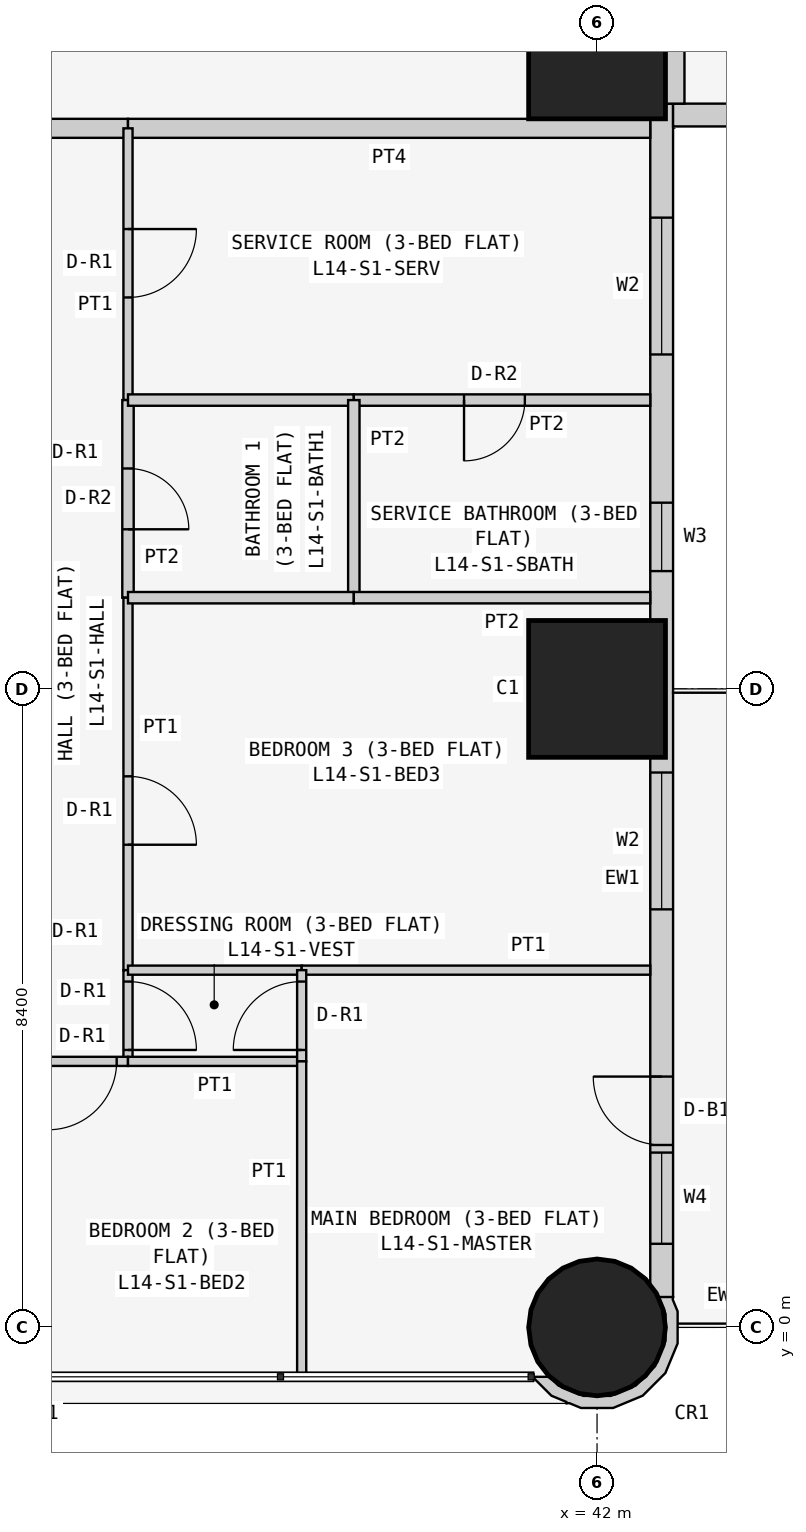
"""IFC4 building model, lengths in metres.
Left out: names, types, materials, properties, quantities, classifications, styles, units other than length and angle.
Written with IfcOpenShell. Run it as: python <this file> out.ifc"""

import sys

from ifc_helpers import new_model, si_unit, direction, frame, frame_2d, origin, origin_2d, place, context, subcontext, project, spatial, polyline, rectangle, circle, outline, extrude, element, fill, save


model = new_model("IFC4")
c1 = context("Model", 3, precision=1e-05, world=origin(), true_north=direction((0.0, 1.0)))
c2 = subcontext(c1, "Body", "Model", "MODEL_VIEW")
j1 = project(units=[si_unit("LENGTHUNIT", "METRE"), si_unit("PLANEANGLEUNIT", "RADIAN")], contexts=[c1])
p1 = place(None, origin())
s1 = spatial("IfcSite", under=j1, at=p1, CompositionType="ELEMENT")
p2 = place(p1, origin())
s2 = spatial("IfcBuilding", under=s1, at=p2, CompositionType="ELEMENT")
p3 = place(p2, frame((0.0, 0.0, 59.7)))
s3 = spatial("IfcBuildingStorey", under=s2, at=p3, CompositionType="ELEMENT", Elevation=59.7)
p4 = place(p3, frame((42.0, 0.0, 0.0), z_axis=(0.0, 0.0, 1.0), x_axis=(1.0, 0.0, 0.0)))
e1 = element("IfcColumn", 1, at=p4, inside=s3, PredefinedType="COLUMN", context=c2, shape_type="SweptSolid", body=[
    extrude(circle(Radius=0.9, at=origin_2d()), origin(), (0.0, 0.0, 1.0), 3.6),
])
for number, where, z_axis, x_axis in (
    (2, (42.0, 8.4, 0.0), (0.0, 0.0, 1.0), (1.0, 0.0, 0.0)),
    (3, (42.0, 16.8, 0.0), (0.0, 0.0, 1.0), (1.0, 0.0, 0.0)),
):
    element("IfcColumn", number, at=place(p3, frame(where, z_axis=z_axis, x_axis=x_axis)), inside=s3, PredefinedType="COLUMN", context=c2, shape_type="SweptSolid", body=[
        extrude(rectangle(XDim=1.8, YDim=1.8, at=origin_2d()), origin(), (0.0, 0.0, 1.0), 3.6),
    ])
p5 = place(p3, frame((42.85, 0.4, 0.0), z_axis=(0.0, 0.0, 1.0), x_axis=(0.0, 1.0, 0.0)))
e4 = element("IfcWall", 4, at=p5, inside=s3, PredefinedType="SOLIDWALL", context=c2, shape_type="SweptSolid", body=[
    extrude(rectangle(XDim=15.7, YDim=0.3, at=frame_2d((7.85, 0.0))), origin(), (0.0, 0.0, 1.0), 3.45),
])
p6 = place(p5, frame((12.4, 0.0, 0.9)))
e5 = element("IfcOpeningElement", 5, at=p6, cuts=e4, PredefinedType="OPENING", context=c2, shape_type="SweptSolid", body=[
    extrude(rectangle(XDim=1.8, YDim=1.5, at=frame_2d((0.9, 0.75))), frame((0.0, 0.16, 0.0), z_axis=(0.0, -1.0, 0.0), x_axis=(1.0, 0.0, 0.0)), (0.0, 0.0, 1.0), 0.32),
])
p7 = place(p5, frame((9.55, 0.0, 1.5)))
e6 = element("IfcOpeningElement", 6, at=p7, cuts=e4, PredefinedType="OPENING", context=c2, shape_type="SweptSolid", body=[
    extrude(rectangle(XDim=0.9, YDim=0.7, at=frame_2d((0.45, 0.35))), frame((0.0, 0.16, 0.0), z_axis=(0.0, -1.0, 0.0), x_axis=(1.0, 0.0, 0.0)), (0.0, 0.0, 1.0), 0.32),
])
p8 = place(p5, frame((5.1, 0.0, 0.9)))
e7 = element("IfcOpeningElement", 7, at=p8, cuts=e4, PredefinedType="OPENING", context=c2, shape_type="SweptSolid", body=[
    extrude(rectangle(XDim=1.8, YDim=1.5, at=frame_2d((0.9, 0.75))), frame((0.0, 0.16, 0.0), z_axis=(0.0, -1.0, 0.0), x_axis=(1.0, 0.0, 0.0)), (0.0, 0.0, 1.0), 0.32),
])
p9 = place(p5, frame((2.0, 0.0, 0.0)))
e8 = element("IfcOpeningElement", 8, at=p9, cuts=e4, PredefinedType="OPENING", context=c2, shape_type="SweptSolid", body=[
    extrude(rectangle(XDim=0.9, YDim=2.4, at=frame_2d((0.45, 1.2))), frame((0.0, 0.16, 0.0), z_axis=(0.0, -1.0, 0.0), x_axis=(1.0, 0.0, 0.0)), (0.0, 0.0, 1.0), 0.32),
])
p10 = place(p5, frame((0.7, 0.0, 0.9)))
e9 = element("IfcOpeningElement", 9, at=p10, cuts=e4, PredefinedType="OPENING", context=c2, shape_type="SweptSolid", body=[
    extrude(rectangle(XDim=1.2, YDim=1.5, at=frame_2d((0.6, 0.75))), frame((0.0, 0.16, 0.0), z_axis=(0.0, -1.0, 0.0), x_axis=(1.0, 0.0, 0.0)), (0.0, 0.0, 1.0), 0.32),
])
p11 = place(p3, frame((43.0, 15.95, 0.0), z_axis=(0.0, 0.0, 1.0), x_axis=(1.0, 0.0, 0.0)))
e10 = element("IfcWall", 10, at=p11, inside=s3, PredefinedType="SOLIDWALL", context=c2, shape_type="SweptSolid", body=[
    extrude(rectangle(XDim=15.4, YDim=0.3, at=frame_2d((7.7, 0.0))), origin(), (0.0, 0.0, 1.0), 3.45),
])
p12 = place(p11, frame((1.2, 0.0, 0.9)))
e11 = element("IfcOpeningElement", 11, at=p12, cuts=e10, PredefinedType="OPENING", context=c2, shape_type="SweptSolid", body=[
    extrude(rectangle(XDim=1.8, YDim=1.5, at=frame_2d((0.9, 0.75))), frame((0.0, 0.16, 0.0), z_axis=(0.0, -1.0, 0.0), x_axis=(1.0, 0.0, 0.0)), (0.0, 0.0, 1.0), 0.32),
])
p13 = place(p11, frame((4.95, 0.0, 1.5)))
e12 = element("IfcOpeningElement", 12, at=p13, cuts=e10, PredefinedType="OPENING", context=c2, shape_type="SweptSolid", body=[
    extrude(rectangle(XDim=0.9, YDim=0.7, at=frame_2d((0.45, 0.35))), frame((0.0, 0.16, 0.0), z_axis=(0.0, -1.0, 0.0), x_axis=(1.0, 0.0, 0.0)), (0.0, 0.0, 1.0), 0.32),
])
p14 = place(p11, frame((8.5, 0.0, 0.9)))
e13 = element("IfcOpeningElement", 13, at=p14, cuts=e10, PredefinedType="OPENING", context=c2, shape_type="SweptSolid", body=[
    extrude(rectangle(XDim=1.8, YDim=1.5, at=frame_2d((0.9, 0.75))), frame((0.0, 0.16, 0.0), z_axis=(0.0, -1.0, 0.0), x_axis=(1.0, 0.0, 0.0)), (0.0, 0.0, 1.0), 0.32),
])
p15 = place(p11, frame((12.5, 0.0, 0.0)))
e14 = element("IfcOpeningElement", 14, at=p15, cuts=e10, PredefinedType="OPENING", context=c2, shape_type="SweptSolid", body=[
    extrude(rectangle(XDim=0.9, YDim=2.4, at=frame_2d((0.45, 1.2))), frame((0.0, 0.16, 0.0), z_axis=(0.0, -1.0, 0.0), x_axis=(1.0, 0.0, 0.0)), (0.0, 0.0, 1.0), 0.32),
])
p16 = place(p11, frame((13.5, 0.0, 0.9)))
e15 = element("IfcOpeningElement", 15, at=p16, cuts=e10, PredefinedType="OPENING", context=c2, shape_type="SweptSolid", body=[
    extrude(rectangle(XDim=1.2, YDim=1.5, at=frame_2d((0.6, 0.75))), frame((0.0, 0.16, 0.0), z_axis=(0.0, -1.0, 0.0), x_axis=(1.0, 0.0, 0.0)), (0.0, 0.0, 1.0), 0.32),
])
p17 = place(p3, frame((41.233, -0.611, 0.0), z_axis=(0.0, 0.0, 1.0), x_axis=(0.377204953059, -0.926129809145, 0.0)))
e16 = element("IfcWall", 16, at=p17, inside=s3, PredefinedType="SOLIDWALL", context=c2, shape_type="SweptSolid", body=[
    extrude(outline(polyline([(0.319, 1.843), (-0.072, 2.001), (-0.24, 2.001), (-0.269, 2.017), (-0.37, 1.841), (-0.102, 1.842), (0.23, 1.707), (0.485, 1.455), (0.624, 1.125), (0.626, 0.766), (0.49, 0.434), (0.239, 0.179), (0.09, 0.117), (0.011, -0.078), (0.024, -0.083), (0.33, 0.045), (0.48, 0.197), (0.499, 0.193), (0.508, 0.225), (0.626, 0.345), (0.785, 0.736), (0.782, 1.157), (0.619, 1.546), (0.319, 1.843)])), origin(), (0.0, 0.0, 1.0), 3.45),
])
p18 = place(p3, frame((43.025, 22.571, 0.0), z_axis=(0.0, 0.0, 1.0), x_axis=(0.0, -1.0, 0.0)))
e17 = element("IfcWall", 17, at=p18, inside=s3, PredefinedType="PARTITIONING", context=c2, shape_type="SweptSolid", body=[
    extrude(rectangle(XDim=6.471, YDim=0.25, at=frame_2d((3.235, 0.0))), origin(), (0.0, 0.0, 1.0), 3.45),
])
p19 = place(p3, frame((35.829, 15.775, 0.0), z_axis=(0.0, 0.0, 1.0), x_axis=(-1.0, 0.0, 0.0)))
e18 = element("IfcWall", 18, at=p19, inside=s3, PredefinedType="PARTITIONING", context=c2, shape_type="SweptSolid", body=[
    extrude(rectangle(XDim=1.2, YDim=0.25, at=frame_2d((0.6, 0.0))), origin(), (0.0, 0.0, 1.0), 3.45),
])
p20 = place(p3, frame((42.7, 15.775, 0.0), z_axis=(0.0, 0.0, 1.0), x_axis=(-1.0, 0.0, 0.0)))
e19 = element("IfcWall", 19, at=p20, inside=s3, PredefinedType="PARTITIONING", context=c2, shape_type="SweptSolid", body=[
    extrude(rectangle(XDim=6.871, YDim=0.25, at=frame_2d((3.436, 0.0))), origin(), (0.0, 0.0, 1.0), 3.45),
])
p21 = place(p3, frame((35.829, 12.2, 0.0), z_axis=(0.0, 0.0, 1.0), x_axis=(0.0, 1.0, 0.0)))
e20 = element("IfcWall", 20, at=p21, inside=s3, PredefinedType="PARTITIONING", context=c2, shape_type="SweptSolid", body=[
    extrude(rectangle(XDim=3.575, YDim=0.12, at=frame_2d((1.788, 0.0))), origin(), (0.0, 0.0, 1.0), 3.45),
])
p22 = place(p21, frame((1.35, 0.0, 0.0)))
e21 = element("IfcOpeningElement", 21, at=p22, cuts=e20, PredefinedType="OPENING", context=c2, shape_type="SweptSolid", body=[
    extrude(rectangle(XDim=0.9, YDim=2.1, at=frame_2d((0.45, 1.05))), frame((0.0, 0.07, 0.0), z_axis=(0.0, -1.0, 0.0), x_axis=(1.0, 0.0, 0.0)), (0.0, 0.0, 1.0), 0.14),
])
p23 = place(p3, frame((35.829, 9.6, 0.0), z_axis=(0.0, 0.0, 1.0), x_axis=(0.0, 1.0, 0.0)))
e22 = element("IfcWall", 22, at=p23, inside=s3, PredefinedType="PARTITIONING", context=c2, shape_type="SweptSolid", body=[
    extrude(rectangle(XDim=2.6, YDim=0.15, at=frame_2d((1.3, 0.0))), origin(), (0.0, 0.0, 1.0), 3.45),
])
p24 = place(p23, frame((0.9, 0.0, 0.0)))
e23 = element("IfcOpeningElement", 23, at=p24, cuts=e22, PredefinedType="OPENING", context=c2, shape_type="SweptSolid", body=[
    extrude(rectangle(XDim=0.8, YDim=2.1, at=frame_2d((0.4, 1.05))), frame((0.0, 0.085, 0.0), z_axis=(0.0, -1.0, 0.0), x_axis=(1.0, 0.0, 0.0)), (0.0, 0.0, 1.0), 0.17),
])
p25 = place(p3, frame((35.829, 4.7, 0.0), z_axis=(0.0, 0.0, 1.0), x_axis=(0.0, 1.0, 0.0)))
e24 = element("IfcWall", 24, at=p25, inside=s3, PredefinedType="PARTITIONING", context=c2, shape_type="SweptSolid", body=[
    extrude(rectangle(XDim=4.9, YDim=0.12, at=frame_2d((2.45, 0.0))), origin(), (0.0, 0.0, 1.0), 3.45),
])
p26 = place(p25, frame((1.65, 0.0, 0.0)))
e25 = element("IfcOpeningElement", 25, at=p26, cuts=e24, PredefinedType="OPENING", context=c2, shape_type="SweptSolid", body=[
    extrude(rectangle(XDim=0.9, YDim=2.1, at=frame_2d((0.45, 1.05))), frame((0.0, 0.07, 0.0), z_axis=(0.0, -1.0, 0.0), x_axis=(1.0, 0.0, 0.0)), (0.0, 0.0, 1.0), 0.14),
])
p27 = place(p3, frame((35.829, 3.5, 0.0), z_axis=(0.0, 0.0, 1.0), x_axis=(0.0, 1.0, 0.0)))
e26 = element("IfcWall", 26, at=p27, inside=s3, PredefinedType="PARTITIONING", context=c2, shape_type="SweptSolid", body=[
    extrude(rectangle(XDim=1.2, YDim=0.12, at=frame_2d((0.6, 0.0))), origin(), (0.0, 0.0, 1.0), 3.45),
])
p28 = place(p27, frame((0.15, 0.0, 0.0)))
e27 = element("IfcOpeningElement", 27, at=p28, cuts=e26, PredefinedType="OPENING", context=c2, shape_type="SweptSolid", body=[
    extrude(rectangle(XDim=0.9, YDim=2.1, at=frame_2d((0.45, 1.05))), frame((0.0, 0.07, 0.0), z_axis=(0.0, -1.0, 0.0), x_axis=(1.0, 0.0, 0.0)), (0.0, 0.0, 1.0), 0.14),
])
p29 = place(p3, frame((34.629, 3.5, 0.0), z_axis=(0.0, 0.0, 1.0), x_axis=(1.0, 0.0, 0.0)))
e28 = element("IfcWall", 28, at=p29, inside=s3, PredefinedType="PARTITIONING", context=c2, shape_type="SweptSolid", body=[
    extrude(rectangle(XDim=1.2, YDim=0.12, at=frame_2d((0.6, 0.0))), origin(), (0.0, 0.0, 1.0), 3.45),
])
p30 = place(p29, frame((0.151, 0.0, 0.0)))
e29 = element("IfcOpeningElement", 29, at=p30, cuts=e28, PredefinedType="OPENING", context=c2, shape_type="SweptSolid", body=[
    extrude(rectangle(XDim=0.9, YDim=2.1, at=frame_2d((0.45, 1.05))), frame((0.0, 0.07, 0.0), z_axis=(0.0, -1.0, 0.0), x_axis=(1.0, 0.0, 0.0)), (0.0, 0.0, 1.0), 0.14),
])
p31 = place(p3, frame((35.829, 12.2, 0.0), z_axis=(0.0, 0.0, 1.0), x_axis=(1.0, 0.0, 0.0)))
e30 = element("IfcWall", 30, at=p31, inside=s3, PredefinedType="PARTITIONING", context=c2, shape_type="SweptSolid", body=[
    extrude(rectangle(XDim=2.971, YDim=0.15, at=frame_2d((1.485, 0.0))), origin(), (0.0, 0.0, 1.0), 3.45),
])
p32 = place(p3, frame((38.8, 12.2, 0.0), z_axis=(0.0, 0.0, 1.0), x_axis=(1.0, 0.0, 0.0)))
e31 = element("IfcWall", 31, at=p32, inside=s3, PredefinedType="PARTITIONING", context=c2, shape_type="SweptSolid", body=[
    extrude(rectangle(XDim=3.9, YDim=0.15, at=frame_2d((1.95, 0.0))), origin(), (0.0, 0.0, 1.0), 3.45),
])
p33 = place(p32, frame((1.45, 0.0, 0.0)))
e32 = element("IfcOpeningElement", 32, at=p33, cuts=e31, PredefinedType="OPENING", context=c2, shape_type="SweptSolid", body=[
    extrude(rectangle(XDim=0.8, YDim=2.1, at=frame_2d((0.4, 1.05))), frame((0.0, 0.085, 0.0), z_axis=(0.0, -1.0, 0.0), x_axis=(1.0, 0.0, 0.0)), (0.0, 0.0, 1.0), 0.17),
])
p34 = place(p3, frame((38.8, 9.6, 0.0), z_axis=(0.0, 0.0, 1.0), x_axis=(0.0, 1.0, 0.0)))
e33 = element("IfcWall", 33, at=p34, inside=s3, PredefinedType="PARTITIONING", context=c2, shape_type="SweptSolid", body=[
    extrude(rectangle(XDim=2.6, YDim=0.15, at=frame_2d((1.3, 0.0))), origin(), (0.0, 0.0, 1.0), 3.45),
])
p35 = place(p3, frame((35.829, 9.6, 0.0), z_axis=(0.0, 0.0, 1.0), x_axis=(1.0, 0.0, 0.0)))
e34 = element("IfcWall", 34, at=p35, inside=s3, PredefinedType="PARTITIONING", context=c2, shape_type="SweptSolid", body=[
    extrude(rectangle(XDim=2.971, YDim=0.15, at=frame_2d((1.485, 0.0))), origin(), (0.0, 0.0, 1.0), 3.45),
])
p36 = place(p3, frame((38.8, 9.6, 0.0), z_axis=(0.0, 0.0, 1.0), x_axis=(1.0, 0.0, 0.0)))
e35 = element("IfcWall", 35, at=p36, inside=s3, PredefinedType="PARTITIONING", context=c2, shape_type="SweptSolid", body=[
    extrude(rectangle(XDim=3.9, YDim=0.15, at=frame_2d((1.95, 0.0))), origin(), (0.0, 0.0, 1.0), 3.45),
])
p37 = place(p3, frame((35.829, 4.7, 0.0), z_axis=(0.0, 0.0, 1.0), x_axis=(1.0, 0.0, 0.0)))
e36 = element("IfcWall", 36, at=p37, inside=s3, PredefinedType="PARTITIONING", context=c2, shape_type="SweptSolid", body=[
    extrude(rectangle(XDim=2.285, YDim=0.12, at=frame_2d((1.143, 0.0))), origin(), (0.0, 0.0, 1.0), 3.45),
])
p38 = place(p3, frame((38.114, 4.7, 0.0), z_axis=(0.0, 0.0, 1.0), x_axis=(1.0, 0.0, 0.0)))
e37 = element("IfcWall", 37, at=p38, inside=s3, PredefinedType="PARTITIONING", context=c2, shape_type="SweptSolid", body=[
    extrude(rectangle(XDim=4.586, YDim=0.12, at=frame_2d((2.293, 0.0))), origin(), (0.0, 0.0, 1.0), 3.45),
])
p39 = place(p3, frame((35.829, 3.5, 0.0), z_axis=(0.0, 0.0, 1.0), x_axis=(1.0, 0.0, 0.0)))
e38 = element("IfcWall", 38, at=p39, inside=s3, PredefinedType="PARTITIONING", context=c2, shape_type="SweptSolid", body=[
    extrude(rectangle(XDim=2.285, YDim=0.12, at=frame_2d((1.143, 0.0))), origin(), (0.0, 0.0, 1.0), 3.45),
])
p40 = place(p3, frame((38.114, 3.5, 0.0), z_axis=(0.0, 0.0, 1.0), x_axis=(0.0, 1.0, 0.0)))
e39 = element("IfcWall", 39, at=p40, inside=s3, PredefinedType="PARTITIONING", context=c2, shape_type="SweptSolid", body=[
    extrude(rectangle(XDim=1.2, YDim=0.12, at=frame_2d((0.6, 0.0))), origin(), (0.0, 0.0, 1.0), 3.45),
])
p41 = place(p40, frame((0.15, 0.0, 0.0)))
e40 = element("IfcOpeningElement", 40, at=p41, cuts=e39, PredefinedType="OPENING", context=c2, shape_type="SweptSolid", body=[
    extrude(rectangle(XDim=0.9, YDim=2.1, at=frame_2d((0.45, 1.05))), frame((0.0, 0.07, 0.0), z_axis=(0.0, -1.0, 0.0), x_axis=(1.0, 0.0, 0.0)), (0.0, 0.0, 1.0), 0.14),
])
p42 = place(p3, frame((38.114, -0.65, 0.0), z_axis=(0.0, 0.0, 1.0), x_axis=(0.0, 1.0, 0.0)))
e41 = element("IfcWall", 41, at=p42, inside=s3, PredefinedType="PARTITIONING", context=c2, shape_type="SweptSolid", body=[
    extrude(rectangle(XDim=4.15, YDim=0.12, at=frame_2d((2.075, 0.0))), origin(), (0.0, 0.0, 1.0), 3.45),
])
p43 = place(p6, origin())
e42 = element("IfcWindow", 42, at=p43, inside=s3, PartitioningType="SINGLE_PANEL", PredefinedType="WINDOW", context=c2, shape_type="SweptSolid", body=[
    extrude(rectangle(XDim=1.8, YDim=1.5, at=frame_2d((0.9, 0.75))), frame((0.0, 0.03, 0.0), z_axis=(0.0, -1.0, 0.0), x_axis=(1.0, 0.0, 0.0)), (0.0, 0.0, 1.0), 0.06),
])
fill(e5, e42)
p44 = place(p7, origin())
e43 = element("IfcWindow", 43, at=p44, inside=s3, PartitioningType="SINGLE_PANEL", PredefinedType="WINDOW", context=c2, shape_type="SweptSolid", body=[
    extrude(rectangle(XDim=0.9, YDim=0.7, at=frame_2d((0.45, 0.35))), frame((0.0, 0.03, 0.0), z_axis=(0.0, -1.0, 0.0), x_axis=(1.0, 0.0, 0.0)), (0.0, 0.0, 1.0), 0.06),
])
fill(e6, e43)
p45 = place(p8, origin())
e44 = element("IfcWindow", 44, at=p45, inside=s3, PartitioningType="SINGLE_PANEL", PredefinedType="WINDOW", context=c2, shape_type="SweptSolid", body=[
    extrude(rectangle(XDim=1.8, YDim=1.5, at=frame_2d((0.9, 0.75))), frame((0.0, 0.03, 0.0), z_axis=(0.0, -1.0, 0.0), x_axis=(1.0, 0.0, 0.0)), (0.0, 0.0, 1.0), 0.06),
])
fill(e7, e44)
p46 = place(p9, origin())
e45 = element("IfcDoor", 45, at=p46, inside=s3, OperationType="SINGLE_SWING_RIGHT", PredefinedType="DOOR", context=c2, shape_type="SweptSolid", body=[
    extrude(rectangle(XDim=0.9, YDim=2.4, at=frame_2d((0.45, 1.2))), frame((0.0, 0.025, 0.0), z_axis=(0.0, -1.0, 0.0), x_axis=(1.0, 0.0, 0.0)), (0.0, 0.0, 1.0), 0.05),
])
fill(e8, e45)
p47 = place(p10, origin())
e46 = element("IfcWindow", 46, at=p47, inside=s3, PartitioningType="SINGLE_PANEL", PredefinedType="WINDOW", context=c2, shape_type="SweptSolid", body=[
    extrude(rectangle(XDim=1.2, YDim=1.5, at=frame_2d((0.6, 0.75))), frame((0.0, 0.03, 0.0), z_axis=(0.0, -1.0, 0.0), x_axis=(1.0, 0.0, 0.0)), (0.0, 0.0, 1.0), 0.06),
])
fill(e9, e46)
p48 = place(p22, frame((0.9, 0.0, 0.0), z_axis=(0.0, 0.0, 1.0), x_axis=(-1.0, 0.0, 0.0)))
e47 = element("IfcDoor", 47, at=p48, inside=s3, OperationType="SINGLE_SWING_LEFT", PredefinedType="DOOR", context=c2, shape_type="SweptSolid", body=[
    extrude(rectangle(XDim=0.9, YDim=2.1, at=frame_2d((0.45, 1.05))), frame((0.0, 0.025, 0.0), z_axis=(0.0, -1.0, 0.0), x_axis=(1.0, 0.0, 0.0)), (0.0, 0.0, 1.0), 0.05),
])
fill(e21, e47)
p49 = place(p33, frame((0.8, 0.0, 0.0), z_axis=(0.0, 0.0, 1.0), x_axis=(-1.0, 0.0, 0.0)))
e48 = element("IfcDoor", 48, at=p49, inside=s3, OperationType="SINGLE_SWING_RIGHT", PredefinedType="DOOR", context=c2, shape_type="SweptSolid", body=[
    extrude(rectangle(XDim=0.8, YDim=2.1, at=frame_2d((0.4, 1.05))), frame((0.0, 0.025, 0.0), z_axis=(0.0, -1.0, 0.0), x_axis=(1.0, 0.0, 0.0)), (0.0, 0.0, 1.0), 0.05),
])
fill(e32, e48)
p50 = place(p24, frame((0.8, 0.0, 0.0), z_axis=(0.0, 0.0, 1.0), x_axis=(-1.0, 0.0, 0.0)))
e49 = element("IfcDoor", 49, at=p50, inside=s3, OperationType="SINGLE_SWING_RIGHT", PredefinedType="DOOR", context=c2, shape_type="SweptSolid", body=[
    extrude(rectangle(XDim=0.8, YDim=2.1, at=frame_2d((0.4, 1.05))), frame((0.0, 0.025, 0.0), z_axis=(0.0, -1.0, 0.0), x_axis=(1.0, 0.0, 0.0)), (0.0, 0.0, 1.0), 0.05),
])
fill(e23, e49)
p51 = place(p26, frame((0.9, 0.0, 0.0), z_axis=(0.0, 0.0, 1.0), x_axis=(-1.0, 0.0, 0.0)))
e50 = element("IfcDoor", 50, at=p51, inside=s3, OperationType="SINGLE_SWING_RIGHT", PredefinedType="DOOR", context=c2, shape_type="SweptSolid", body=[
    extrude(rectangle(XDim=0.9, YDim=2.1, at=frame_2d((0.45, 1.05))), frame((0.0, 0.025, 0.0), z_axis=(0.0, -1.0, 0.0), x_axis=(1.0, 0.0, 0.0)), (0.0, 0.0, 1.0), 0.05),
])
fill(e25, e50)
p52 = place(p28, frame((0.9, 0.0, 0.0), z_axis=(0.0, 0.0, 1.0), x_axis=(-1.0, 0.0, 0.0)))
e51 = element("IfcDoor", 51, at=p52, inside=s3, OperationType="SINGLE_SWING_RIGHT", PredefinedType="DOOR", context=c2, shape_type="SweptSolid", body=[
    extrude(rectangle(XDim=0.9, YDim=2.1, at=frame_2d((0.45, 1.05))), frame((0.0, 0.025, 0.0), z_axis=(0.0, -1.0, 0.0), x_axis=(1.0, 0.0, 0.0)), (0.0, 0.0, 1.0), 0.05),
])
fill(e27, e51)
p53 = place(p41, origin())
e52 = element("IfcDoor", 52, at=p53, inside=s3, OperationType="SINGLE_SWING_LEFT", PredefinedType="DOOR", context=c2, shape_type="SweptSolid", body=[
    extrude(rectangle(XDim=0.9, YDim=2.1, at=frame_2d((0.45, 1.05))), frame((0.0, 0.025, 0.0), z_axis=(0.0, -1.0, 0.0), x_axis=(1.0, 0.0, 0.0)), (0.0, 0.0, 1.0), 0.05),
])
fill(e40, e52)
p54 = place(p30, frame((0.9, 0.0, 0.0), z_axis=(0.0, 0.0, 1.0), x_axis=(-1.0, 0.0, 0.0)))
e53 = element("IfcDoor", 53, at=p54, inside=s3, OperationType="SINGLE_SWING_RIGHT", PredefinedType="DOOR", context=c2, shape_type="SweptSolid", body=[
    extrude(rectangle(XDim=0.9, YDim=2.1, at=frame_2d((0.45, 1.05))), frame((0.0, 0.025, 0.0), z_axis=(0.0, -1.0, 0.0), x_axis=(1.0, 0.0, 0.0)), (0.0, 0.0, 1.0), 0.05),
])
fill(e29, e53)
save(model, sys.argv[1])
